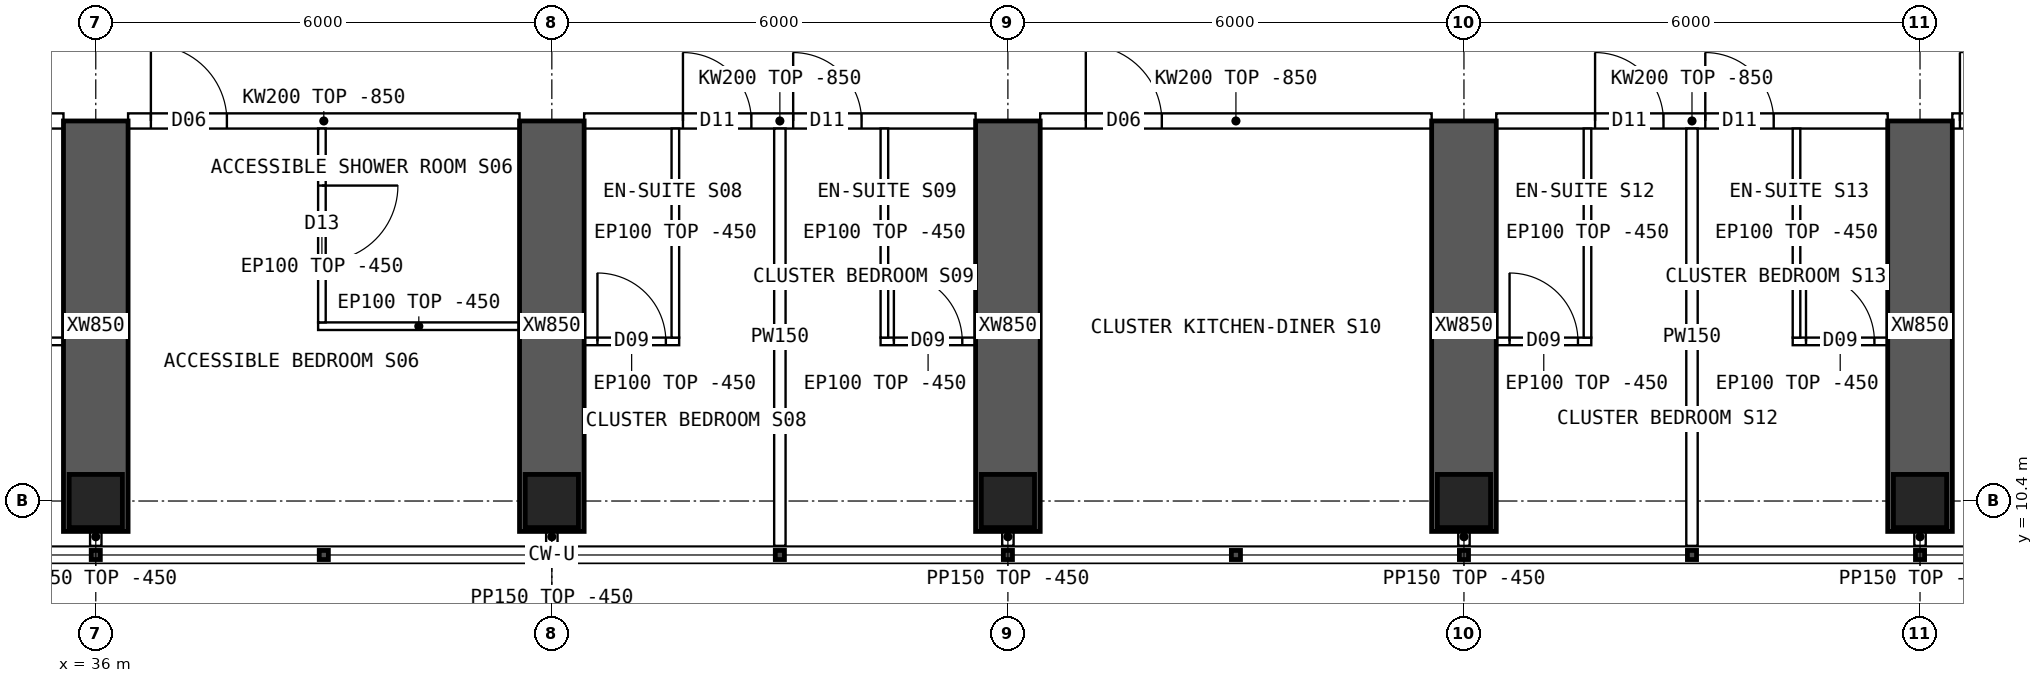
"""IFC4 building model, lengths in metres.
Left out: names, types, materials, properties, quantities, classifications, styles, units other than length and angle.
Written with IfcOpenShell. Run it as: python <this file> out.ifc"""

import sys

from ifc_helpers import new_model, si_unit, direction, frame, frame_2d, origin, origin_2d, place, context, subcontext, project, spatial, polyline, rectangle, hollow_rectangle, outline, extrude, element, fill, save


model = new_model("IFC4")
c1 = context("Model", 3, precision=1e-05, world=origin(), true_north=direction((0.0, 1.0)))
c2 = subcontext(c1, "Body", "Model", "MODEL_VIEW")
j1 = project(units=[si_unit("LENGTHUNIT", "METRE"), si_unit("PLANEANGLEUNIT", "RADIAN")], contexts=[c1])
p1 = place(None, origin())
s1 = spatial("IfcSite", under=j1, at=p1, CompositionType="ELEMENT")
p2 = place(p1, origin())
s2 = spatial("IfcBuilding", under=s1, at=p2, CompositionType="ELEMENT")
p3 = place(p2, frame((0.0, 0.0, 174.85)))
s3 = spatial("IfcBuildingStorey", under=s2, at=p3, CompositionType="ELEMENT", Elevation=174.85)
for number, where, z_axis, x_axis in (
    (1, (36.0, 10.4, 0.0), (0.0, 0.0, 1.0), (1.0, 0.0, 0.0)),
    (2, (42.0, 10.4, 0.0), (0.0, 0.0, 1.0), (1.0, 0.0, 0.0)),
    (3, (48.0, 10.4, 0.0), (0.0, 0.0, 1.0), (1.0, 0.0, 0.0)),
    (4, (54.0, 10.4, 0.0), (0.0, 0.0, 1.0), (1.0, 0.0, 0.0)),
    (5, (60.0, 10.4, 0.0), (0.0, 0.0, 1.0), (1.0, 0.0, 0.0)),
):
    element("IfcColumn", number, at=place(p3, frame(where, z_axis=z_axis, x_axis=x_axis)), inside=s3, PredefinedType="COLUMN", context=c2, shape_type="SweptSolid", body=[
        extrude(hollow_rectangle(XDim=0.7, YDim=0.7, WallThickness=0.07, at=origin_2d()), origin(), (0.0, 0.0, 1.0), 3.75),
    ])
for number, where, z_axis, x_axis in (
    (6, (36.0, 10.0, 0.0), (0.0, 0.0, 1.0), (0.0, 1.0, 0.0)),
    (7, (42.0, 10.0, 0.0), (0.0, 0.0, 1.0), (0.0, 1.0, 0.0)),
    (8, (48.0, 10.0, 0.0), (0.0, 0.0, 1.0), (0.0, 1.0, 0.0)),
    (9, (54.0, 10.0, 0.0), (0.0, 0.0, 1.0), (0.0, 1.0, 0.0)),
    (10, (60.0, 10.0, 0.0), (0.0, 0.0, 1.0), (0.0, 1.0, 0.0)),
):
    element("IfcWall", number, at=place(p3, frame(where, z_axis=z_axis, x_axis=x_axis)), inside=s3, PredefinedType="SHEAR", context=c2, shape_type="SweptSolid", body=[
        extrude(rectangle(XDim=5.4, YDim=0.85, at=frame_2d((2.7, 0.0))), origin(), (0.0, 0.0, 1.0), 3.75),
    ])
p4 = place(p3, frame((30.425, 15.4, 0.0), z_axis=(0.0, 0.0, 1.0), x_axis=(1.0, 0.0, 0.0)))
e11 = element("IfcWall", 11, at=p4, inside=s3, PredefinedType="SOLIDWALL", context=c2, shape_type="SweptSolid", body=[
    extrude(outline(polyline([(0.0, 0.0), (5.15, 0.0), (5.15, 2.9), (0.0, 2.9), (0.0, 0.0)])), frame((0.0, 0.1, 0.0), z_axis=(0.0, -1.0, 0.0), x_axis=(1.0, 0.0, 0.0)), (0.0, 0.0, 1.0), 0.2),
])
p5 = place(p4, frame((0.1, 0.0, 0.0)))
e12 = element("IfcOpeningElement", 12, at=p5, cuts=e11, PredefinedType="OPENING", context=c2, shape_type="SweptSolid", body=[
    extrude(rectangle(XDim=0.9, YDim=2.1, at=frame_2d((0.45, 1.05))), frame((0.0, 0.11, 0.0), z_axis=(0.0, -1.0, 0.0), x_axis=(1.0, 0.0, 0.0)), (0.0, 0.0, 1.0), 0.22),
])
p6 = place(p3, frame((36.425, 15.4, 0.0), z_axis=(0.0, 0.0, 1.0), x_axis=(1.0, 0.0, 0.0)))
e13 = element("IfcWall", 13, at=p6, inside=s3, PredefinedType="SOLIDWALL", context=c2, shape_type="SweptSolid", body=[
    extrude(outline(polyline([(0.0, 0.0), (5.15, 0.0), (5.15, 2.9), (0.0, 2.9), (0.0, 0.0)])), frame((0.0, 0.1, 0.0), z_axis=(0.0, -1.0, 0.0), x_axis=(1.0, 0.0, 0.0)), (0.0, 0.0, 1.0), 0.2),
])
p7 = place(p6, frame((0.3, 0.0, 0.0)))
e14 = element("IfcOpeningElement", 14, at=p7, cuts=e13, PredefinedType="OPENING", context=c2, shape_type="SweptSolid", body=[
    extrude(rectangle(XDim=1.0, YDim=2.1, at=frame_2d((0.5, 1.05))), frame((0.0, 0.11, 0.0), z_axis=(0.0, -1.0, 0.0), x_axis=(1.0, 0.0, 0.0)), (0.0, 0.0, 1.0), 0.22),
])
p8 = place(p3, frame((42.425, 15.4, 0.0), z_axis=(0.0, 0.0, 1.0), x_axis=(1.0, 0.0, 0.0)))
e15 = element("IfcWall", 15, at=p8, inside=s3, PredefinedType="SOLIDWALL", context=c2, shape_type="SweptSolid", body=[
    extrude(outline(polyline([(0.0, 0.0), (5.15, 0.0), (5.15, 2.9), (0.0, 2.9), (0.0, 0.0)])), frame((0.0, 0.1, 0.0), z_axis=(0.0, -1.0, 0.0), x_axis=(1.0, 0.0, 0.0)), (0.0, 0.0, 1.0), 0.2),
])
p9 = place(p8, frame((1.3, 0.0, 0.0)))
e16 = element("IfcOpeningElement", 16, at=p9, cuts=e15, PredefinedType="OPENING", context=c2, shape_type="SweptSolid", body=[
    extrude(rectangle(XDim=0.9, YDim=2.1, at=frame_2d((0.45, 1.05))), frame((0.0, 0.11, 0.0), z_axis=(0.0, -1.0, 0.0), x_axis=(1.0, 0.0, 0.0)), (0.0, 0.0, 1.0), 0.22),
])
p10 = place(p8, frame((2.75, 0.0, 0.0)))
e17 = element("IfcOpeningElement", 17, at=p10, cuts=e15, PredefinedType="OPENING", context=c2, shape_type="SweptSolid", body=[
    extrude(rectangle(XDim=0.9, YDim=2.1, at=frame_2d((0.45, 1.05))), frame((0.0, 0.11, 0.0), z_axis=(0.0, -1.0, 0.0), x_axis=(1.0, 0.0, 0.0)), (0.0, 0.0, 1.0), 0.22),
])
p11 = place(p3, frame((48.425, 15.4, 0.0), z_axis=(0.0, 0.0, 1.0), x_axis=(1.0, 0.0, 0.0)))
e18 = element("IfcWall", 18, at=p11, inside=s3, PredefinedType="SOLIDWALL", context=c2, shape_type="SweptSolid", body=[
    extrude(outline(polyline([(0.0, 0.0), (5.15, 0.0), (5.15, 2.9), (0.0, 2.9), (0.0, 0.0)])), frame((0.0, 0.1, 0.0), z_axis=(0.0, -1.0, 0.0), x_axis=(1.0, 0.0, 0.0)), (0.0, 0.0, 1.0), 0.2),
])
p12 = place(p11, frame((0.6, 0.0, 0.0)))
e19 = element("IfcOpeningElement", 19, at=p12, cuts=e18, PredefinedType="OPENING", context=c2, shape_type="SweptSolid", body=[
    extrude(rectangle(XDim=1.0, YDim=2.1, at=frame_2d((0.5, 1.05))), frame((0.0, 0.11, 0.0), z_axis=(0.0, -1.0, 0.0), x_axis=(1.0, 0.0, 0.0)), (0.0, 0.0, 1.0), 0.22),
])
p13 = place(p3, frame((54.425, 15.4, 0.0), z_axis=(0.0, 0.0, 1.0), x_axis=(1.0, 0.0, 0.0)))
e20 = element("IfcWall", 20, at=p13, inside=s3, PredefinedType="SOLIDWALL", context=c2, shape_type="SweptSolid", body=[
    extrude(outline(polyline([(0.0, 0.0), (5.15, 0.0), (5.15, 2.9), (0.0, 2.9), (0.0, 0.0)])), frame((0.0, 0.1, 0.0), z_axis=(0.0, -1.0, 0.0), x_axis=(1.0, 0.0, 0.0)), (0.0, 0.0, 1.0), 0.2),
])
p14 = place(p13, frame((1.3, 0.0, 0.0)))
e21 = element("IfcOpeningElement", 21, at=p14, cuts=e20, PredefinedType="OPENING", context=c2, shape_type="SweptSolid", body=[
    extrude(rectangle(XDim=0.9, YDim=2.1, at=frame_2d((0.45, 1.05))), frame((0.0, 0.11, 0.0), z_axis=(0.0, -1.0, 0.0), x_axis=(1.0, 0.0, 0.0)), (0.0, 0.0, 1.0), 0.22),
])
p15 = place(p13, frame((2.75, 0.0, 0.0)))
e22 = element("IfcOpeningElement", 22, at=p15, cuts=e20, PredefinedType="OPENING", context=c2, shape_type="SweptSolid", body=[
    extrude(rectangle(XDim=0.9, YDim=2.1, at=frame_2d((0.45, 1.05))), frame((0.0, 0.11, 0.0), z_axis=(0.0, -1.0, 0.0), x_axis=(1.0, 0.0, 0.0)), (0.0, 0.0, 1.0), 0.22),
])
p16 = place(p3, frame((60.425, 15.4, 0.0), z_axis=(0.0, 0.0, 1.0), x_axis=(1.0, 0.0, 0.0)))
e23 = element("IfcWall", 23, at=p16, inside=s3, PredefinedType="SOLIDWALL", context=c2, shape_type="SweptSolid", body=[
    extrude(outline(polyline([(0.0, 0.0), (5.15, 0.0), (5.15, 2.9), (0.0, 2.9), (0.0, 0.0)])), frame((0.0, 0.1, 0.0), z_axis=(0.0, -1.0, 0.0), x_axis=(1.0, 0.0, 0.0)), (0.0, 0.0, 1.0), 0.2),
])
p17 = place(p16, frame((0.1, 0.0, 0.0)))
e24 = element("IfcOpeningElement", 24, at=p17, cuts=e23, PredefinedType="OPENING", context=c2, shape_type="SweptSolid", body=[
    extrude(rectangle(XDim=0.9, YDim=2.1, at=frame_2d((0.45, 1.05))), frame((0.0, 0.11, 0.0), z_axis=(0.0, -1.0, 0.0), x_axis=(1.0, 0.0, 0.0)), (0.0, 0.0, 1.0), 0.22),
])
p18 = place(p3, frame((35.575, 12.5, 0.0), z_axis=(0.0, 0.0, 1.0), x_axis=(-1.0, 0.0, 0.0)))
e25 = element("IfcWall", 25, at=p18, inside=s3, PredefinedType="PARTITIONING", context=c2, shape_type="SweptSolid", body=[
    extrude(rectangle(XDim=2.55, YDim=0.1, at=frame_2d((1.275, 0.0))), origin(), (0.0, 0.0, 1.0), 3.3),
])
p19 = place(p18, frame((0.825, 0.0, 0.0)))
e26 = element("IfcOpeningElement", 26, at=p19, cuts=e25, PredefinedType="OPENING", context=c2, shape_type="SweptSolid", body=[
    extrude(rectangle(XDim=0.9, YDim=2.1, at=frame_2d((0.45, 1.05))), frame((0.0, 0.06, 0.0), z_axis=(0.0, -1.0, 0.0), x_axis=(1.0, 0.0, 0.0)), (0.0, 0.0, 1.0), 0.12),
])
p20 = place(p3, frame((38.925, 12.7, 0.0), z_axis=(0.0, 0.0, 1.0), x_axis=(1.0, 0.0, 0.0)))
e27 = element("IfcWall", 27, at=p20, inside=s3, PredefinedType="PARTITIONING", context=c2, shape_type="SweptSolid", body=[
    extrude(rectangle(XDim=2.65, YDim=0.1, at=frame_2d((1.325, 0.0))), origin(), (0.0, 0.0, 1.0), 3.3),
])
p21 = place(p3, frame((38.975, 12.75, 0.0), z_axis=(0.0, 0.0, 1.0), x_axis=(0.0, 1.0, 0.0)))
e28 = element("IfcWall", 28, at=p21, inside=s3, PredefinedType="PARTITIONING", context=c2, shape_type="SweptSolid", body=[
    extrude(outline(polyline([(0.0, 0.0), (2.55, 0.0), (2.55, 2.9), (2.502, 2.9), (2.5, 3.3), (0.0, 3.3), (0.0, 0.0)])), frame((0.0, 0.05, 0.0), z_axis=(0.0, -1.0, 0.0), x_axis=(1.0, 0.0, 0.0)), (0.0, 0.0, 1.0), 0.1),
])
p22 = place(p21, frame((0.8, 0.0, 0.0)))
e29 = element("IfcOpeningElement", 29, at=p22, cuts=e28, PredefinedType="OPENING", context=c2, shape_type="SweptSolid", body=[
    extrude(rectangle(XDim=1.0, YDim=2.1, at=frame_2d((0.5, 1.05))), frame((0.0, 0.06, 0.0), z_axis=(0.0, -1.0, 0.0), x_axis=(1.0, 0.0, 0.0)), (0.0, 0.0, 1.0), 0.12),
])
p23 = place(p3, frame((45.0, 9.81, 0.0), z_axis=(0.0, 0.0, 1.0), x_axis=(0.0, 1.0, 0.0)))
e30 = element("IfcWall", 30, at=p23, inside=s3, PredefinedType="PARTITIONING", context=c2, shape_type="SweptSolid", body=[
    extrude(outline(polyline([(0.0, 0.0), (5.49, 0.0), (5.49, 2.9), (5.442, 2.9), (5.44, 3.3), (0.792, 3.3), (0.79, 2.9), (0.392, 2.9), (0.39, 3.3), (0.0, 3.3), (0.0, 0.0)])), frame((0.0, 0.075, 0.0), z_axis=(0.0, -1.0, 0.0), x_axis=(1.0, 0.0, 0.0)), (0.0, 0.0, 1.0), 0.15),
])
p24 = place(p3, frame((43.675, 12.5, 0.0), z_axis=(0.0, 0.0, 1.0), x_axis=(-1.0, 0.0, 0.0)))
e31 = element("IfcWall", 31, at=p24, inside=s3, PredefinedType="PARTITIONING", context=c2, shape_type="SweptSolid", body=[
    extrude(rectangle(XDim=1.25, YDim=0.1, at=frame_2d((0.625, 0.0))), origin(), (0.0, 0.0, 1.0), 3.3),
])
p25 = place(p24, frame((0.175, 0.0, 0.0)))
e32 = element("IfcOpeningElement", 32, at=p25, cuts=e31, PredefinedType="OPENING", context=c2, shape_type="SweptSolid", body=[
    extrude(rectangle(XDim=0.9, YDim=2.1, at=frame_2d((0.45, 1.05))), frame((0.0, 0.06, 0.0), z_axis=(0.0, -1.0, 0.0), x_axis=(1.0, 0.0, 0.0)), (0.0, 0.0, 1.0), 0.12),
])
p26 = place(p3, frame((43.625, 12.55, 0.0), z_axis=(0.0, 0.0, 1.0), x_axis=(0.0, 1.0, 0.0)))
e33 = element("IfcWall", 33, at=p26, inside=s3, PredefinedType="PARTITIONING", context=c2, shape_type="SweptSolid", body=[
    extrude(outline(polyline([(0.0, 0.0), (2.75, 0.0), (2.75, 2.9), (2.702, 2.9), (2.7, 3.3), (0.0, 3.3), (0.0, 0.0)])), frame((0.0, 0.05, 0.0), z_axis=(0.0, -1.0, 0.0), x_axis=(1.0, 0.0, 0.0)), (0.0, 0.0, 1.0), 0.1),
])
p27 = place(p3, frame((47.575, 12.5, 0.0), z_axis=(0.0, 0.0, 1.0), x_axis=(-1.0, 0.0, 0.0)))
e34 = element("IfcWall", 34, at=p27, inside=s3, PredefinedType="PARTITIONING", context=c2, shape_type="SweptSolid", body=[
    extrude(rectangle(XDim=1.25, YDim=0.1, at=frame_2d((0.625, 0.0))), origin(), (0.0, 0.0, 1.0), 3.3),
])
p28 = place(p27, frame((0.175, 0.0, 0.0)))
e35 = element("IfcOpeningElement", 35, at=p28, cuts=e34, PredefinedType="OPENING", context=c2, shape_type="SweptSolid", body=[
    extrude(rectangle(XDim=0.9, YDim=2.1, at=frame_2d((0.45, 1.05))), frame((0.0, 0.06, 0.0), z_axis=(0.0, -1.0, 0.0), x_axis=(1.0, 0.0, 0.0)), (0.0, 0.0, 1.0), 0.12),
])
p29 = place(p3, frame((46.375, 12.55, 0.0), z_axis=(0.0, 0.0, 1.0), x_axis=(0.0, 1.0, 0.0)))
e36 = element("IfcWall", 36, at=p29, inside=s3, PredefinedType="PARTITIONING", context=c2, shape_type="SweptSolid", body=[
    extrude(outline(polyline([(0.0, 0.0), (2.75, 0.0), (2.75, 2.9), (2.702, 2.9), (2.7, 3.3), (0.0, 3.3), (0.0, 0.0)])), frame((0.0, 0.05, 0.0), z_axis=(0.0, -1.0, 0.0), x_axis=(1.0, 0.0, 0.0)), (0.0, 0.0, 1.0), 0.1),
])
p30 = place(p3, frame((57.0, 9.81, 0.0), z_axis=(0.0, 0.0, 1.0), x_axis=(0.0, 1.0, 0.0)))
e37 = element("IfcWall", 37, at=p30, inside=s3, PredefinedType="PARTITIONING", context=c2, shape_type="SweptSolid", body=[
    extrude(outline(polyline([(0.0, 0.0), (5.49, 0.0), (5.49, 2.9), (5.442, 2.9), (5.44, 3.3), (0.792, 3.3), (0.79, 2.9), (0.392, 2.9), (0.39, 3.3), (0.0, 3.3), (0.0, 0.0)])), frame((0.0, 0.075, 0.0), z_axis=(0.0, -1.0, 0.0), x_axis=(1.0, 0.0, 0.0)), (0.0, 0.0, 1.0), 0.15),
])
p31 = place(p3, frame((55.675, 12.5, 0.0), z_axis=(0.0, 0.0, 1.0), x_axis=(-1.0, 0.0, 0.0)))
e38 = element("IfcWall", 38, at=p31, inside=s3, PredefinedType="PARTITIONING", context=c2, shape_type="SweptSolid", body=[
    extrude(rectangle(XDim=1.25, YDim=0.1, at=frame_2d((0.625, 0.0))), origin(), (0.0, 0.0, 1.0), 3.3),
])
p32 = place(p31, frame((0.175, 0.0, 0.0)))
e39 = element("IfcOpeningElement", 39, at=p32, cuts=e38, PredefinedType="OPENING", context=c2, shape_type="SweptSolid", body=[
    extrude(rectangle(XDim=0.9, YDim=2.1, at=frame_2d((0.45, 1.05))), frame((0.0, 0.06, 0.0), z_axis=(0.0, -1.0, 0.0), x_axis=(1.0, 0.0, 0.0)), (0.0, 0.0, 1.0), 0.12),
])
p33 = place(p3, frame((55.625, 12.55, 0.0), z_axis=(0.0, 0.0, 1.0), x_axis=(0.0, 1.0, 0.0)))
e40 = element("IfcWall", 40, at=p33, inside=s3, PredefinedType="PARTITIONING", context=c2, shape_type="SweptSolid", body=[
    extrude(outline(polyline([(0.0, 0.0), (2.75, 0.0), (2.75, 2.9), (2.702, 2.9), (2.7, 3.3), (0.0, 3.3), (0.0, 0.0)])), frame((0.0, 0.05, 0.0), z_axis=(0.0, -1.0, 0.0), x_axis=(1.0, 0.0, 0.0)), (0.0, 0.0, 1.0), 0.1),
])
p34 = place(p3, frame((59.575, 12.5, 0.0), z_axis=(0.0, 0.0, 1.0), x_axis=(-1.0, 0.0, 0.0)))
e41 = element("IfcWall", 41, at=p34, inside=s3, PredefinedType="PARTITIONING", context=c2, shape_type="SweptSolid", body=[
    extrude(rectangle(XDim=1.25, YDim=0.1, at=frame_2d((0.625, 0.0))), origin(), (0.0, 0.0, 1.0), 3.3),
])
p35 = place(p34, frame((0.175, 0.0, 0.0)))
e42 = element("IfcOpeningElement", 42, at=p35, cuts=e41, PredefinedType="OPENING", context=c2, shape_type="SweptSolid", body=[
    extrude(rectangle(XDim=0.9, YDim=2.1, at=frame_2d((0.45, 1.05))), frame((0.0, 0.06, 0.0), z_axis=(0.0, -1.0, 0.0), x_axis=(1.0, 0.0, 0.0)), (0.0, 0.0, 1.0), 0.12),
])
p36 = place(p3, frame((58.375, 12.55, 0.0), z_axis=(0.0, 0.0, 1.0), x_axis=(0.0, 1.0, 0.0)))
e43 = element("IfcWall", 43, at=p36, inside=s3, PredefinedType="PARTITIONING", context=c2, shape_type="SweptSolid", body=[
    extrude(outline(polyline([(0.0, 0.0), (2.75, 0.0), (2.75, 2.9), (2.702, 2.9), (2.7, 3.3), (0.0, 3.3), (0.0, 0.0)])), frame((0.0, 0.05, 0.0), z_axis=(0.0, -1.0, 0.0), x_axis=(1.0, 0.0, 0.0)), (0.0, 0.0, 1.0), 0.1),
])
for number, where, z_axis, x_axis in (
    (44, (36.0, 10.05, 0.0), (0.0, 0.0, 1.0), (0.0, -1.0, 0.0)),
    (45, (42.0, 10.05, 0.0), (0.0, 0.0, 1.0), (0.0, -1.0, 0.0)),
    (46, (48.0, 10.05, 0.0), (0.0, 0.0, 1.0), (0.0, -1.0, 0.0)),
    (47, (54.0, 10.05, 0.0), (0.0, 0.0, 1.0), (0.0, -1.0, 0.0)),
    (48, (60.0, 10.05, 0.0), (0.0, 0.0, 1.0), (0.0, -1.0, 0.0)),
):
    element("IfcWall", number, at=place(p3, frame(where, z_axis=z_axis, x_axis=x_axis)), inside=s3, PredefinedType="PARTITIONING", context=c2, shape_type="SweptSolid", body=[
        extrude(rectangle(XDim=0.24, YDim=0.15, at=frame_2d((0.12, 0.0))), origin(), (0.0, 0.0, 1.0), 3.3),
    ])
p37 = place(p22, origin())
e49 = element("IfcDoor", 49, at=p37, inside=s3, OperationType="SINGLE_SWING_RIGHT", PredefinedType="DOOR", context=c2, shape_type="SweptSolid", body=[
    extrude(rectangle(XDim=1.0, YDim=2.1, at=frame_2d((0.5, 1.05))), frame((0.0, 0.025, 0.0), z_axis=(0.0, -1.0, 0.0), x_axis=(1.0, 0.0, 0.0)), (0.0, 0.0, 1.0), 0.05),
])
fill(e29, e49)
p38 = place(p7, origin())
e50 = element("IfcDoor", 50, at=p38, inside=s3, OperationType="SINGLE_SWING_LEFT", PredefinedType="DOOR", context=c2, shape_type="SweptSolid", body=[
    extrude(rectangle(XDim=1.0, YDim=2.1, at=frame_2d((0.5, 1.05))), frame((0.0, 0.025, 0.0), z_axis=(0.0, -1.0, 0.0), x_axis=(1.0, 0.0, 0.0)), (0.0, 0.0, 1.0), 0.05),
])
fill(e14, e50)
p39 = place(p25, origin())
e51 = element("IfcDoor", 51, at=p39, inside=s3, OperationType="SINGLE_SWING_RIGHT", PredefinedType="DOOR", context=c2, shape_type="SweptSolid", body=[
    extrude(rectangle(XDim=0.9, YDim=2.1, at=frame_2d((0.45, 1.05))), frame((0.0, 0.025, 0.0), z_axis=(0.0, -1.0, 0.0), x_axis=(1.0, 0.0, 0.0)), (0.0, 0.0, 1.0), 0.05),
])
fill(e32, e51)
p40 = place(p9, origin())
e52 = element("IfcDoor", 52, at=p40, inside=s3, OperationType="SINGLE_SWING_LEFT", PredefinedType="DOOR", context=c2, shape_type="SweptSolid", body=[
    extrude(rectangle(XDim=0.9, YDim=2.1, at=frame_2d((0.45, 1.05))), frame((0.0, 0.025, 0.0), z_axis=(0.0, -1.0, 0.0), x_axis=(1.0, 0.0, 0.0)), (0.0, 0.0, 1.0), 0.05),
])
fill(e16, e52)
p41 = place(p28, origin())
e53 = element("IfcDoor", 53, at=p41, inside=s3, OperationType="SINGLE_SWING_RIGHT", PredefinedType="DOOR", context=c2, shape_type="SweptSolid", body=[
    extrude(rectangle(XDim=0.9, YDim=2.1, at=frame_2d((0.45, 1.05))), frame((0.0, 0.025, 0.0), z_axis=(0.0, -1.0, 0.0), x_axis=(1.0, 0.0, 0.0)), (0.0, 0.0, 1.0), 0.05),
])
fill(e35, e53)
p42 = place(p10, origin())
e54 = element("IfcDoor", 54, at=p42, inside=s3, OperationType="SINGLE_SWING_LEFT", PredefinedType="DOOR", context=c2, shape_type="SweptSolid", body=[
    extrude(rectangle(XDim=0.9, YDim=2.1, at=frame_2d((0.45, 1.05))), frame((0.0, 0.025, 0.0), z_axis=(0.0, -1.0, 0.0), x_axis=(1.0, 0.0, 0.0)), (0.0, 0.0, 1.0), 0.05),
])
fill(e17, e54)
p43 = place(p12, origin())
e55 = element("IfcDoor", 55, at=p43, inside=s3, OperationType="SINGLE_SWING_LEFT", PredefinedType="DOOR", context=c2, shape_type="SweptSolid", body=[
    extrude(rectangle(XDim=1.0, YDim=2.1, at=frame_2d((0.5, 1.05))), frame((0.0, 0.025, 0.0), z_axis=(0.0, -1.0, 0.0), x_axis=(1.0, 0.0, 0.0)), (0.0, 0.0, 1.0), 0.05),
])
fill(e19, e55)
p44 = place(p32, origin())
e56 = element("IfcDoor", 56, at=p44, inside=s3, OperationType="SINGLE_SWING_RIGHT", PredefinedType="DOOR", context=c2, shape_type="SweptSolid", body=[
    extrude(rectangle(XDim=0.9, YDim=2.1, at=frame_2d((0.45, 1.05))), frame((0.0, 0.025, 0.0), z_axis=(0.0, -1.0, 0.0), x_axis=(1.0, 0.0, 0.0)), (0.0, 0.0, 1.0), 0.05),
])
fill(e39, e56)
p45 = place(p14, origin())
e57 = element("IfcDoor", 57, at=p45, inside=s3, OperationType="SINGLE_SWING_LEFT", PredefinedType="DOOR", context=c2, shape_type="SweptSolid", body=[
    extrude(rectangle(XDim=0.9, YDim=2.1, at=frame_2d((0.45, 1.05))), frame((0.0, 0.025, 0.0), z_axis=(0.0, -1.0, 0.0), x_axis=(1.0, 0.0, 0.0)), (0.0, 0.0, 1.0), 0.05),
])
fill(e21, e57)
p46 = place(p35, origin())
e58 = element("IfcDoor", 58, at=p46, inside=s3, OperationType="SINGLE_SWING_RIGHT", PredefinedType="DOOR", context=c2, shape_type="SweptSolid", body=[
    extrude(rectangle(XDim=0.9, YDim=2.1, at=frame_2d((0.45, 1.05))), frame((0.0, 0.025, 0.0), z_axis=(0.0, -1.0, 0.0), x_axis=(1.0, 0.0, 0.0)), (0.0, 0.0, 1.0), 0.05),
])
fill(e42, e58)
p47 = place(p15, origin())
e59 = element("IfcDoor", 59, at=p47, inside=s3, OperationType="SINGLE_SWING_LEFT", PredefinedType="DOOR", context=c2, shape_type="SweptSolid", body=[
    extrude(rectangle(XDim=0.9, YDim=2.1, at=frame_2d((0.45, 1.05))), frame((0.0, 0.025, 0.0), z_axis=(0.0, -1.0, 0.0), x_axis=(1.0, 0.0, 0.0)), (0.0, 0.0, 1.0), 0.05),
])
fill(e22, e59)
p48 = place(p17, origin())
e60 = element("IfcDoor", 60, at=p48, inside=s3, OperationType="SINGLE_SWING_LEFT", PredefinedType="DOOR", context=c2, shape_type="SweptSolid", body=[
    extrude(rectangle(XDim=0.9, YDim=2.1, at=frame_2d((0.45, 1.05))), frame((0.0, 0.025, 0.0), z_axis=(0.0, -1.0, 0.0), x_axis=(1.0, 0.0, 0.0)), (0.0, 0.0, 1.0), 0.05),
])
fill(e24, e60)
save(model, sys.argv[1])
